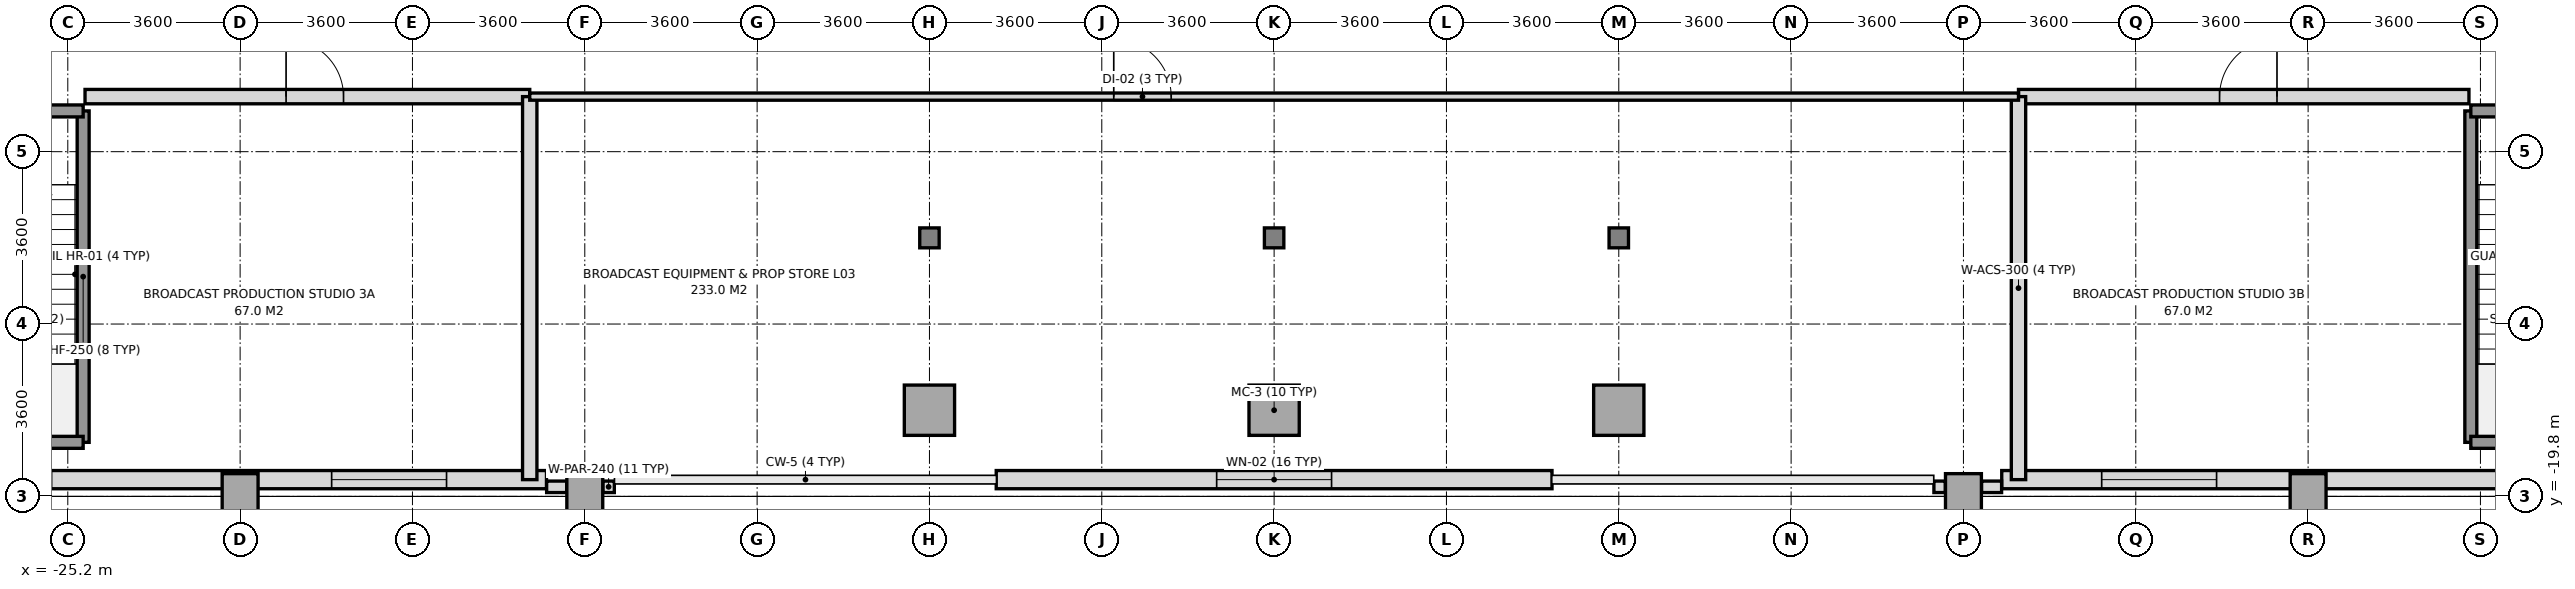
"""IFC4 building model, lengths in metres.
Left out: names, types, materials, properties, quantities, classifications, styles, units other than length and angle.
Written with IfcOpenShell. Run it as: python <this file> out.ifc"""

import sys

from ifc_helpers import new_model, si_unit, direction, frame, frame_2d, origin, origin_2d, place, context, subcontext, project, spatial, rectangle, i_section, extrude, source, transform, mapped, element, fill, save


model = new_model("IFC4")
c1 = context("Model", 3, precision=1e-05, world=origin(), true_north=direction((0.0, 1.0)))
c2 = subcontext(c1, "Body", "Model", "MODEL_VIEW")
j1 = project(units=[si_unit("LENGTHUNIT", "METRE"), si_unit("PLANEANGLEUNIT", "RADIAN")], contexts=[c1])
p1 = place(None, origin())
s1 = spatial("IfcSite", under=j1, at=p1, CompositionType="ELEMENT")
p2 = place(p1, origin())
s2 = spatial("IfcBuilding", under=s1, at=p2, CompositionType="ELEMENT")
p3 = place(p2, frame((0.0, 0.0, 15.6)))
s3 = spatial("IfcBuildingStorey", under=s2, at=p3, CompositionType="ELEMENT", Elevation=15.6)
m1 = source(origin(), c2, "Body", "SweptSolid", [
    extrude(rectangle(XDim=0.75, YDim=0.95, at=origin_2d()), origin(), (0.0, 0.0, 1.0), 4.55),
])
for number, where, z_axis, x_axis in (
    (1, (-21.6, -19.8, 0.0), (0.0, 0.0, 1.0), (1.0, 0.0, 0.0)),
    (2, (-14.4, -19.8, 0.0), (0.0, 0.0, 1.0), (1.0, 0.0, 0.0)),
):
    element("IfcColumn", number, at=place(p3, frame(where, z_axis=z_axis, x_axis=x_axis)), inside=s3, PredefinedType="COLUMN", context=c2, shape_type="MappedRepresentation", body=[
        mapped(m1, transform((0.0, 0.0, 0.0), x_axis=(1.0, 0.0, 0.0), y_axis=(0.0, 1.0, 0.0), z_axis=(0.0, 0.0, 1.0), scale=1.0)),
    ])
m2 = source(origin(), c2, "Body", "SweptSolid", [
    extrude(rectangle(XDim=1.05, YDim=1.05, at=origin_2d()), origin(), (0.0, 0.0, 1.0), 4.55),
])
p4 = place(p3, frame((-7.2, -18.0, 0.0), z_axis=(0.0, 0.0, 1.0), x_axis=(1.0, 0.0, 0.0)))
e3 = element("IfcColumn", 3, at=p4, inside=s3, PredefinedType="COLUMN", context=c2, shape_type="MappedRepresentation", body=[
    mapped(m2, transform((0.0, 0.0, 0.0), x_axis=(1.0, 0.0, 0.0), y_axis=(0.0, 1.0, 0.0), z_axis=(0.0, 0.0, 1.0), scale=1.0)),
])
m3 = source(origin(), c2, "Body", "SweptSolid", [
    extrude(i_section(OverallWidth=0.406, OverallDepth=0.416, WebThickness=0.024, FlangeThickness=0.039, at=origin_2d()), origin(), (0.0, 0.0, 1.0), 4.55),
])
p5 = place(p3, frame((-7.2, -14.4, 0.0), z_axis=(0.0, 0.0, 1.0), x_axis=(1.0, 0.0, 0.0)))
e4 = element("IfcColumn", 4, at=p5, inside=s3, PredefinedType="COLUMN", context=c2, shape_type="MappedRepresentation", body=[
    mapped(m3, transform((0.0, 0.0, 0.0), x_axis=(1.0, 0.0, 0.0), y_axis=(0.0, 1.0, 0.0), z_axis=(0.0, 0.0, 1.0), scale=1.0)),
])
p6 = place(p3, frame((0.0, -18.0, 0.0), z_axis=(0.0, 0.0, 1.0), x_axis=(1.0, 0.0, 0.0)))
e5 = element("IfcColumn", 5, at=p6, inside=s3, PredefinedType="COLUMN", context=c2, shape_type="MappedRepresentation", body=[
    mapped(m2, transform((0.0, 0.0, 0.0), x_axis=(1.0, 0.0, 0.0), y_axis=(0.0, 1.0, 0.0), z_axis=(0.0, 0.0, 1.0), scale=1.0)),
])
p7 = place(p3, frame((0.0, -14.4, 0.0), z_axis=(0.0, 0.0, 1.0), x_axis=(1.0, 0.0, 0.0)))
e6 = element("IfcColumn", 6, at=p7, inside=s3, PredefinedType="COLUMN", context=c2, shape_type="MappedRepresentation", body=[
    mapped(m3, transform((0.0, 0.0, 0.0), x_axis=(1.0, 0.0, 0.0), y_axis=(0.0, 1.0, 0.0), z_axis=(0.0, 0.0, 1.0), scale=1.0)),
])
p8 = place(p3, frame((7.2, -18.0, 0.0), z_axis=(0.0, 0.0, 1.0), x_axis=(1.0, 0.0, 0.0)))
e7 = element("IfcColumn", 7, at=p8, inside=s3, PredefinedType="COLUMN", context=c2, shape_type="MappedRepresentation", body=[
    mapped(m2, transform((0.0, 0.0, 0.0), x_axis=(1.0, 0.0, 0.0), y_axis=(0.0, 1.0, 0.0), z_axis=(0.0, 0.0, 1.0), scale=1.0)),
])
p9 = place(p3, frame((7.2, -14.4, 0.0), z_axis=(0.0, 0.0, 1.0), x_axis=(1.0, 0.0, 0.0)))
e8 = element("IfcColumn", 8, at=p9, inside=s3, PredefinedType="COLUMN", context=c2, shape_type="MappedRepresentation", body=[
    mapped(m3, transform((0.0, 0.0, 0.0), x_axis=(1.0, 0.0, 0.0), y_axis=(0.0, 1.0, 0.0), z_axis=(0.0, 0.0, 1.0), scale=1.0)),
])
for number, where, z_axis, x_axis in (
    (9, (14.4, -19.8, 0.0), (0.0, 0.0, 1.0), (1.0, 0.0, 0.0)),
    (10, (21.6, -19.8, 0.0), (0.0, 0.0, 1.0), (1.0, 0.0, 0.0)),
):
    element("IfcColumn", number, at=place(p3, frame(where, z_axis=z_axis, x_axis=x_axis)), inside=s3, PredefinedType="COLUMN", context=c2, shape_type="MappedRepresentation", body=[
        mapped(m1, transform((0.0, 0.0, 0.0), x_axis=(1.0, 0.0, 0.0), y_axis=(0.0, 1.0, 0.0), z_axis=(0.0, 0.0, 1.0), scale=1.0)),
    ])
p10 = place(p3, frame((-32.05, -19.45, 0.0), z_axis=(0.0, 0.0, 1.0), x_axis=(1.0, 0.0, 0.0)))
e11 = element("IfcWall", 11, at=p10, inside=s3, PredefinedType="SOLIDWALL", context=c2, shape_type="SweptSolid", body=[
    extrude(rectangle(XDim=16.85, YDim=0.38, at=frame_2d((8.425, 0.0))), origin(), (0.0, 0.0, 1.0), 3.8),
])
p11 = place(p10, frame((4.112, 0.0, 0.95)))
e12 = element("IfcOpeningElement", 12, at=p11, cuts=e11, PredefinedType="OPENING", context=c2, shape_type="SweptSolid", body=[
    extrude(rectangle(XDim=2.4, YDim=2.2, at=frame_2d((1.2, 1.1))), frame((0.0, 0.2, 0.0), z_axis=(0.0, -1.0, 0.0), x_axis=(1.0, 0.0, 0.0)), (0.0, 0.0, 1.0), 0.4),
])
p12 = place(p10, frame((12.362, 0.0, 0.95)))
e13 = element("IfcOpeningElement", 13, at=p12, cuts=e11, PredefinedType="OPENING", context=c2, shape_type="SweptSolid", body=[
    extrude(rectangle(XDim=2.4, YDim=2.2, at=frame_2d((1.2, 1.1))), frame((0.0, 0.2, 0.0), z_axis=(0.0, -1.0, 0.0), x_axis=(1.0, 0.0, 0.0)), (0.0, 0.0, 1.0), 0.4),
])
p13 = place(p3, frame((15.2, -19.45, 0.0), z_axis=(0.0, 0.0, 1.0), x_axis=(1.0, 0.0, 0.0)))
e14 = element("IfcWall", 14, at=p13, inside=s3, PredefinedType="SOLIDWALL", context=c2, shape_type="SweptSolid", body=[
    extrude(rectangle(XDim=16.85, YDim=0.38, at=frame_2d((8.425, 0.0))), origin(), (0.0, 0.0, 1.0), 3.8),
])
p14 = place(p13, frame((2.088, 0.0, 0.95)))
e15 = element("IfcOpeningElement", 15, at=p14, cuts=e14, PredefinedType="OPENING", context=c2, shape_type="SweptSolid", body=[
    extrude(rectangle(XDim=2.4, YDim=2.2, at=frame_2d((1.2, 1.1))), frame((0.0, 0.2, 0.0), z_axis=(0.0, -1.0, 0.0), x_axis=(1.0, 0.0, 0.0)), (0.0, 0.0, 1.0), 0.4),
])
p15 = place(p13, frame((10.338, 0.0, 0.95)))
e16 = element("IfcOpeningElement", 16, at=p15, cuts=e14, PredefinedType="OPENING", context=c2, shape_type="SweptSolid", body=[
    extrude(rectangle(XDim=2.4, YDim=2.2, at=frame_2d((1.2, 1.1))), frame((0.0, 0.2, 0.0), z_axis=(0.0, -1.0, 0.0), x_axis=(1.0, 0.0, 0.0)), (0.0, 0.0, 1.0), 0.4),
])
p16 = place(p3, frame((-5.805, -19.45, 0.0), z_axis=(0.0, 0.0, 1.0), x_axis=(1.0, 0.0, 0.0)))
e17 = element("IfcWall", 17, at=p16, inside=s3, PredefinedType="SOLIDWALL", context=c2, shape_type="SweptSolid", body=[
    extrude(rectangle(XDim=11.61, YDim=0.38, at=frame_2d((5.805, 0.0))), origin(), (0.0, 0.0, 1.0), 3.95),
])
p17 = place(p16, frame((4.605, 0.0, 0.95)))
e18 = element("IfcOpeningElement", 18, at=p17, cuts=e17, PredefinedType="OPENING", context=c2, shape_type="SweptSolid", body=[
    extrude(rectangle(XDim=2.4, YDim=2.2, at=frame_2d((1.2, 1.1))), frame((0.0, 0.2, 0.0), z_axis=(0.0, -1.0, 0.0), x_axis=(1.0, 0.0, 0.0)), (0.0, 0.0, 1.0), 0.4),
])
p18 = place(p3, frame((15.197, -19.6, 0.0), z_axis=(0.0, 0.0, 1.0), x_axis=(-1.0, 0.0, 0.0)))
e19 = element("IfcWall", 19, at=p18, inside=s3, PredefinedType="PARAPET", context=c2, shape_type="SweptSolid", body=[
    extrude(rectangle(XDim=0.419, YDim=0.24, at=frame_2d((0.209, 0.0))), origin(), (0.0, 0.0, 1.0), 1.15),
])
for number, where, z_axis, x_axis in (
    (20, (14.022, -19.6, 0.0), (0.0, 0.0, 1.0), (-1.0, 0.0, 0.0)),
    (21, (-13.783, -19.6, 0.0), (0.0, 0.0, 1.0), (-1.0, 0.0, 0.0)),
):
    element("IfcWall", number, at=place(p3, frame(where, z_axis=z_axis, x_axis=x_axis)), inside=s3, PredefinedType="PARAPET", context=c2, shape_type="SweptSolid", body=[
        extrude(rectangle(XDim=0.239, YDim=0.24, at=frame_2d((0.12, 0.0))), origin(), (0.0, 0.0, 1.0), 1.15),
    ])
p19 = place(p3, frame((-14.778, -19.6, 0.0), z_axis=(0.0, 0.0, 1.0), x_axis=(-1.0, 0.0, 0.0)))
e22 = element("IfcWall", 22, at=p19, inside=s3, PredefinedType="PARAPET", context=c2, shape_type="SweptSolid", body=[
    extrude(rectangle(XDim=0.419, YDim=0.24, at=frame_2d((0.209, 0.0))), origin(), (0.0, 0.0, 1.0), 1.15),
])
p20 = place(p3, frame((-24.879, -18.671, 0.0), z_axis=(0.0, 0.0, 1.0), x_axis=(0.0, 1.0, 0.0)))
e23 = element("IfcWall", 23, at=p20, inside=s3, PredefinedType="SOLIDWALL", context=c2, shape_type="SweptSolid", body=[
    extrude(rectangle(XDim=6.922, YDim=0.25, at=frame_2d((3.461, 0.0))), origin(), (0.0, 0.0, 1.0), 4.55),
])
p21 = place(p3, frame((-28.001, -18.671, 0.0), z_axis=(0.0, 0.0, 1.0), x_axis=(1.0, 0.0, 0.0)))
e24 = element("IfcWall", 24, at=p21, inside=s3, PredefinedType="SOLIDWALL", context=c2, shape_type="SweptSolid", body=[
    extrude(rectangle(XDim=3.122, YDim=0.25, at=frame_2d((1.561, 0.0))), origin(), (0.0, 0.0, 1.0), 4.55),
])
p22 = place(p3, frame((-28.001, -11.749, 0.0), z_axis=(0.0, 0.0, 1.0), x_axis=(1.0, 0.0, 0.0)))
e25 = element("IfcWall", 25, at=p22, inside=s3, PredefinedType="SOLIDWALL", context=c2, shape_type="SweptSolid", body=[
    extrude(rectangle(XDim=3.122, YDim=0.25, at=frame_2d((1.561, 0.0))), origin(), (0.0, 0.0, 1.0), 4.55),
])
p23 = place(p22, frame((0.8, 0.0, 0.0)))
e26 = element("IfcOpeningElement", 26, at=p23, cuts=e25, PredefinedType="OPENING", context=c2, shape_type="SweptSolid", body=[
    extrude(rectangle(XDim=1.2, YDim=2.2, at=frame_2d((0.6, 1.1))), frame((0.0, 0.135, 0.0), z_axis=(0.0, -1.0, 0.0), x_axis=(1.0, 0.0, 0.0)), (0.0, 0.0, 1.0), 0.27),
])
p24 = place(p3, frame((24.999, -18.671, 0.0), z_axis=(0.0, 0.0, 1.0), x_axis=(0.0, 1.0, 0.0)))
e27 = element("IfcWall", 27, at=p24, inside=s3, PredefinedType="SOLIDWALL", context=c2, shape_type="SweptSolid", body=[
    extrude(rectangle(XDim=6.922, YDim=0.25, at=frame_2d((3.461, 0.0))), origin(), (0.0, 0.0, 1.0), 4.55),
])
p25 = place(p3, frame((24.999, -18.671, 0.0), z_axis=(0.0, 0.0, 1.0), x_axis=(1.0, 0.0, 0.0)))
e28 = element("IfcWall", 28, at=p25, inside=s3, PredefinedType="SOLIDWALL", context=c2, shape_type="SweptSolid", body=[
    extrude(rectangle(XDim=3.122, YDim=0.25, at=frame_2d((1.561, 0.0))), origin(), (0.0, 0.0, 1.0), 4.55),
])
p26 = place(p3, frame((24.999, -11.749, 0.0), z_axis=(0.0, 0.0, 1.0), x_axis=(1.0, 0.0, 0.0)))
e29 = element("IfcWall", 29, at=p26, inside=s3, PredefinedType="SOLIDWALL", context=c2, shape_type="SweptSolid", body=[
    extrude(rectangle(XDim=3.122, YDim=0.25, at=frame_2d((1.561, 0.0))), origin(), (0.0, 0.0, 1.0), 4.55),
])
p27 = place(p26, frame((0.8, 0.0, 0.0)))
e30 = element("IfcOpeningElement", 30, at=p27, cuts=e29, PredefinedType="OPENING", context=c2, shape_type="SweptSolid", body=[
    extrude(rectangle(XDim=1.2, YDim=2.2, at=frame_2d((0.6, 1.1))), frame((0.0, 0.135, 0.0), z_axis=(0.0, -1.0, 0.0), x_axis=(1.0, 0.0, 0.0)), (0.0, 0.0, 1.0), 0.27),
])
p28 = place(p3, frame((-24.84, -11.45, 0.0), z_axis=(0.0, 0.0, 1.0), x_axis=(1.0, 0.0, 0.0)))
e31 = element("IfcWall", 31, at=p28, inside=s3, PredefinedType="SOLIDWALL", context=c2, shape_type="SweptSolid", body=[
    extrude(rectangle(XDim=9.29, YDim=0.3, at=frame_2d((4.645, 0.0))), origin(), (0.0, 0.0, 1.0), 4.55),
])
p29 = place(p28, frame((4.2, 0.0, 0.0)))
e32 = element("IfcOpeningElement", 32, at=p29, cuts=e31, PredefinedType="OPENING", context=c2, shape_type="SweptSolid", body=[
    extrude(rectangle(XDim=1.2, YDim=2.2, at=frame_2d((0.6, 1.1))), frame((0.0, 0.16, 0.0), z_axis=(0.0, -1.0, 0.0), x_axis=(1.0, 0.0, 0.0)), (0.0, 0.0, 1.0), 0.32),
])
p30 = place(p3, frame((-15.55, -19.45, 0.0), z_axis=(0.0, 0.0, 1.0), x_axis=(0.0, 1.0, 0.0)))
e33 = element("IfcWall", 33, at=p30, inside=s3, PredefinedType="SOLIDWALL", context=c2, shape_type="SweptSolid", body=[
    extrude(rectangle(XDim=8.0, YDim=0.3, at=frame_2d((4.0, 0.0))), origin(), (0.0, 0.0, 1.0), 3.8),
])
p31 = place(p3, frame((15.55, -11.45, 0.0), z_axis=(0.0, 0.0, 1.0), x_axis=(1.0, 0.0, 0.0)))
e34 = element("IfcWall", 34, at=p31, inside=s3, PredefinedType="SOLIDWALL", context=c2, shape_type="SweptSolid", body=[
    extrude(rectangle(XDim=9.41, YDim=0.3, at=frame_2d((4.705, 0.0))), origin(), (0.0, 0.0, 1.0), 4.55),
])
p32 = place(p31, frame((4.2, 0.0, 0.0)))
e35 = element("IfcOpeningElement", 35, at=p32, cuts=e34, PredefinedType="OPENING", context=c2, shape_type="SweptSolid", body=[
    extrude(rectangle(XDim=1.2, YDim=2.2, at=frame_2d((0.6, 1.1))), frame((0.0, 0.16, 0.0), z_axis=(0.0, -1.0, 0.0), x_axis=(1.0, 0.0, 0.0)), (0.0, 0.0, 1.0), 0.32),
])
p33 = place(p3, frame((15.55, -19.45, 0.0), z_axis=(0.0, 0.0, 1.0), x_axis=(0.0, 1.0, 0.0)))
e36 = element("IfcWall", 36, at=p33, inside=s3, PredefinedType="SOLIDWALL", context=c2, shape_type="SweptSolid", body=[
    extrude(rectangle(XDim=8.0, YDim=0.3, at=frame_2d((4.0, 0.0))), origin(), (0.0, 0.0, 1.0), 3.8),
])
p34 = place(p3, frame((-15.55, -11.45, 0.0), z_axis=(0.0, 0.0, 1.0), x_axis=(1.0, 0.0, 0.0)))
e37 = element("IfcWall", 37, at=p34, inside=s3, PredefinedType="PARTITIONING", context=c2, shape_type="SweptSolid", body=[
    extrude(rectangle(XDim=31.1, YDim=0.15, at=frame_2d((15.55, 0.0))), origin(), (0.0, 0.0, 1.0), 3.95),
])
p35 = place(p34, frame((12.2, 0.0, 0.0)))
e38 = element("IfcOpeningElement", 38, at=p35, cuts=e37, PredefinedType="OPENING", context=c2, shape_type="SweptSolid", body=[
    extrude(rectangle(XDim=1.2, YDim=2.2, at=frame_2d((0.6, 1.1))), frame((0.0, 0.085, 0.0), z_axis=(0.0, -1.0, 0.0), x_axis=(1.0, 0.0, 0.0)), (0.0, 0.0, 1.0), 0.17),
])
m4 = source(origin(), c2, "Body", "SweptSolid", [
    extrude(rectangle(XDim=2.4, YDim=2.2, at=frame_2d((1.2, 1.1))), frame((0.0, 0.03, 0.0), z_axis=(0.0, -1.0, 0.0), x_axis=(1.0, 0.0, 0.0)), (0.0, 0.0, 1.0), 0.06),
])
p36 = place(p12, origin())
e39 = element("IfcWindow", 39, at=p36, inside=s3, PartitioningType="SINGLE_PANEL", PredefinedType="WINDOW", context=c2, shape_type="MappedRepresentation", body=[
    mapped(m4, transform((0.0, 0.0, 0.0), x_axis=(1.0, 0.0, 0.0), y_axis=(0.0, 1.0, 0.0), z_axis=(0.0, 0.0, 1.0), scale=1.0)),
])
fill(e13, e39)
p37 = place(p14, origin())
e40 = element("IfcWindow", 40, at=p37, inside=s3, PartitioningType="SINGLE_PANEL", PredefinedType="WINDOW", context=c2, shape_type="MappedRepresentation", body=[
    mapped(m4, transform((0.0, 0.0, 0.0), x_axis=(1.0, 0.0, 0.0), y_axis=(0.0, 1.0, 0.0), z_axis=(0.0, 0.0, 1.0), scale=1.0)),
])
fill(e15, e40)
p38 = place(p17, origin())
e41 = element("IfcWindow", 41, at=p38, inside=s3, PartitioningType="SINGLE_PANEL", PredefinedType="WINDOW", context=c2, shape_type="MappedRepresentation", body=[
    mapped(m4, transform((0.0, 0.0, 0.0), x_axis=(1.0, 0.0, 0.0), y_axis=(0.0, 1.0, 0.0), z_axis=(0.0, 0.0, 1.0), scale=1.0)),
])
fill(e18, e41)
m5 = source(origin(), c2, "Body", "SweptSolid", [
    extrude(rectangle(XDim=1.2, YDim=2.2, at=frame_2d((0.6, 1.1))), frame((0.0, 0.025, 0.0), z_axis=(0.0, -1.0, 0.0), x_axis=(1.0, 0.0, 0.0)), (0.0, 0.0, 1.0), 0.05),
])
p39 = place(p29, origin())
e42 = element("IfcDoor", 42, at=p39, inside=s3, OperationType="SINGLE_SWING_LEFT", PredefinedType="DOOR", context=c2, shape_type="MappedRepresentation", body=[
    mapped(m5, transform((0.0, 0.0, 0.0), x_axis=(1.0, 0.0, 0.0), y_axis=(0.0, 1.0, 0.0), z_axis=(0.0, 0.0, 1.0), scale=1.0)),
])
fill(e32, e42)
p40 = place(p32, origin())
e43 = element("IfcDoor", 43, at=p40, inside=s3, OperationType="SINGLE_SWING_RIGHT", PredefinedType="DOOR", context=c2, shape_type="MappedRepresentation", body=[
    mapped(m5, transform((0.0, 0.0, 0.0), x_axis=(1.0, 0.0, 0.0), y_axis=(0.0, 1.0, 0.0), z_axis=(0.0, 0.0, 1.0), scale=1.0)),
])
fill(e35, e43)
p41 = place(p35, origin())
e44 = element("IfcDoor", 44, at=p41, inside=s3, OperationType="SINGLE_SWING_LEFT", PredefinedType="DOOR", context=c2, shape_type="MappedRepresentation", body=[
    mapped(m5, transform((0.0, 0.0, 0.0), x_axis=(1.0, 0.0, 0.0), y_axis=(0.0, 1.0, 0.0), z_axis=(0.0, 0.0, 1.0), scale=1.0)),
])
fill(e38, e44)
save(model, sys.argv[1])
